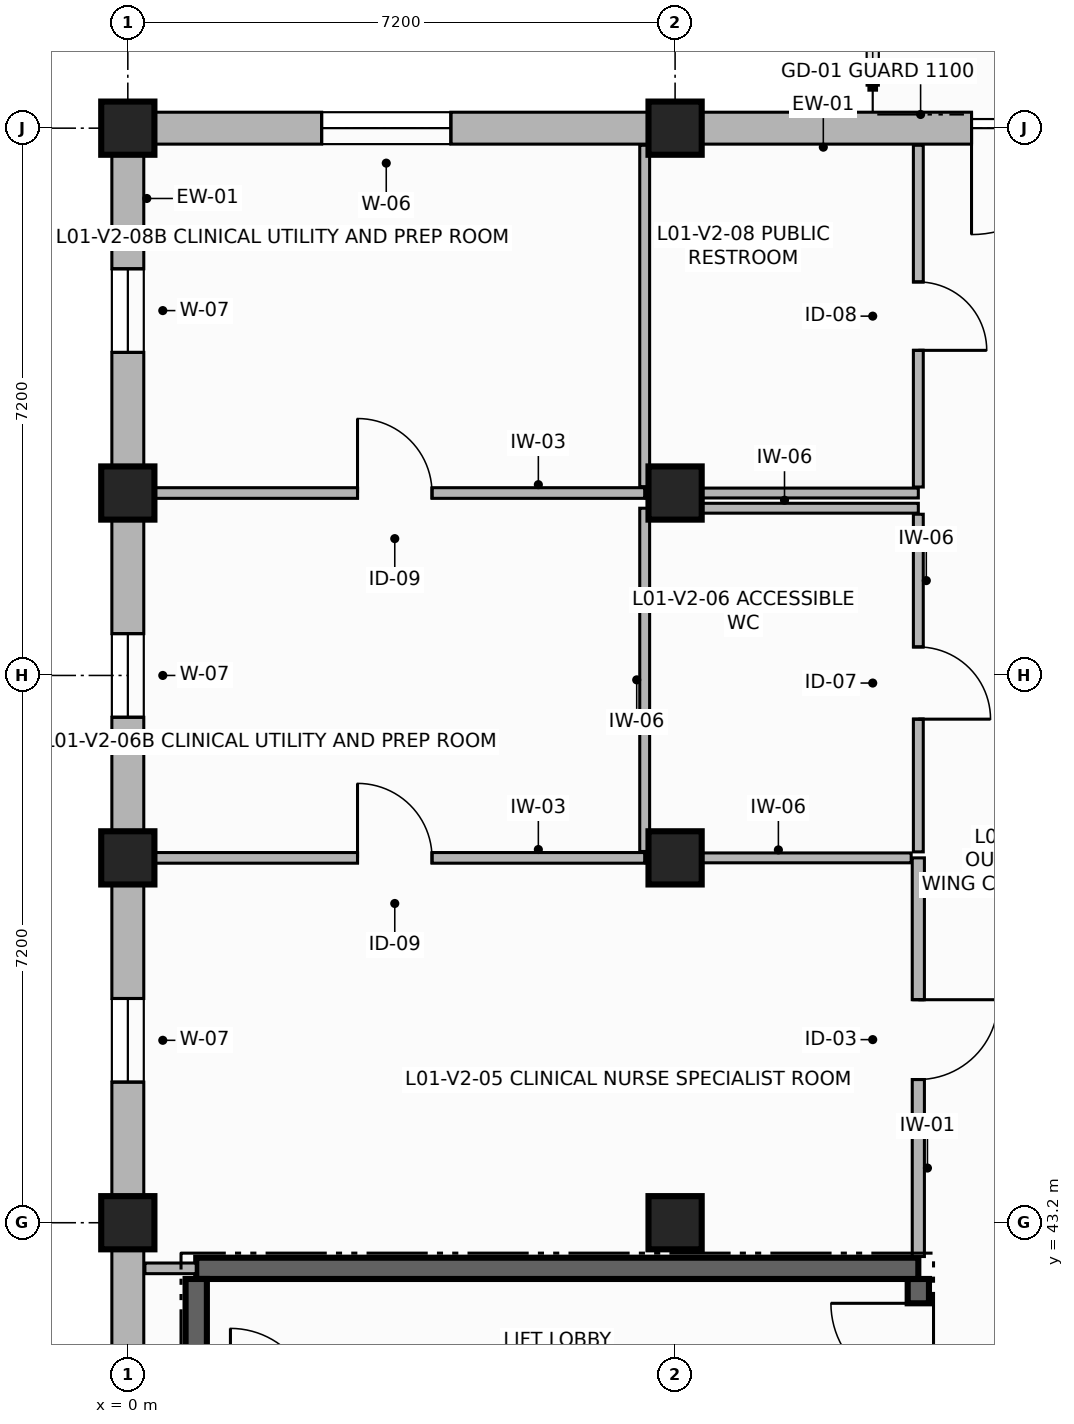
"""IFC4 building model, lengths in metres.
Left out: names, types, materials, properties, quantities, classifications, styles, units other than length and angle.
Written with IfcOpenShell. Run it as: python <this file> out.ifc"""

import sys

from ifc_helpers import new_model, si_unit, direction, frame, frame_2d, origin, origin_2d, place, context, subcontext, project, spatial, rectangle, extrude, element, fill, save


model = new_model("IFC4")
c1 = context("Model", 3, precision=1e-05, world=origin(), true_north=direction((0.0, 1.0)))
c2 = subcontext(c1, "Body", "Model", "MODEL_VIEW")
j1 = project(units=[si_unit("LENGTHUNIT", "METRE"), si_unit("PLANEANGLEUNIT", "RADIAN")], contexts=[c1])
p1 = place(None, origin())
s1 = spatial("IfcSite", under=j1, at=p1, CompositionType="ELEMENT")
p2 = place(p1, origin())
s2 = spatial("IfcBuilding", under=s1, at=p2, CompositionType="ELEMENT")
p3 = place(p2, frame((0.0, 0.0, 4.5)))
s3 = spatial("IfcBuildingStorey", under=s2, at=p3, CompositionType="ELEMENT", Elevation=4.5)
for number, where, z_axis, x_axis in (
    (1, (0.0, 43.2, 0.0), (0.0, 0.0, 1.0), (1.0, 0.0, 0.0)),
    (2, (0.0, 48.0, 0.0), (0.0, 0.0, 1.0), (1.0, 0.0, 0.0)),
    (3, (0.0, 52.8, 0.0), (0.0, 0.0, 1.0), (1.0, 0.0, 0.0)),
    (4, (0.0, 57.6, 0.0), (0.0, 0.0, 1.0), (1.0, 0.0, 0.0)),
    (5, (7.2, 43.2, 0.0), (0.0, 0.0, 1.0), (1.0, 0.0, 0.0)),
    (6, (7.2, 48.0, 0.0), (0.0, 0.0, 1.0), (1.0, 0.0, 0.0)),
    (7, (7.2, 52.8, 0.0), (0.0, 0.0, 1.0), (1.0, 0.0, 0.0)),
    (8, (7.2, 57.6, 0.0), (0.0, 0.0, 1.0), (1.0, 0.0, 0.0)),
):
    element("IfcColumn", number, at=place(p3, frame(where, z_axis=z_axis, x_axis=x_axis)), inside=s3, PredefinedType="COLUMN", context=c2, shape_type="SweptSolid", body=[
        extrude(rectangle(XDim=0.7, YDim=0.7, at=origin_2d()), origin(), (0.0, 0.0, 1.0), 3.62),
    ])
p4 = place(p3, frame((14.4, 57.6, 0.0), z_axis=(0.0, 0.0, 1.0), x_axis=(-1.0, 0.0, 0.0)))
e9 = element("IfcWall", 9, at=p4, inside=s3, PredefinedType="SOLIDWALL", context=c2, shape_type="SweptSolid", body=[
    extrude(rectangle(XDim=7.2, YDim=0.42, at=frame_2d((3.6, 0.0))), origin(), (0.0, 0.0, 1.0), 3.0),
])
p5 = place(p4, frame((1.9, 0.0, 0.0)))
e10 = element("IfcOpeningElement", 10, at=p5, cuts=e9, PredefinedType="OPENING", context=c2, shape_type="SweptSolid", body=[
    extrude(rectangle(XDim=1.4, YDim=2.25, at=frame_2d((0.7, 1.125))), frame((0.0, 0.22, 0.0), z_axis=(0.0, -1.0, 0.0), x_axis=(1.0, 0.0, 0.0)), (0.0, 0.0, 1.0), 0.44),
])
p6 = place(p3, frame((7.2, 57.6, 0.0), z_axis=(0.0, 0.0, 1.0), x_axis=(-1.0, 0.0, 0.0)))
e11 = element("IfcWall", 11, at=p6, inside=s3, PredefinedType="SOLIDWALL", context=c2, shape_type="SweptSolid", body=[
    extrude(rectangle(XDim=7.2, YDim=0.42, at=frame_2d((3.6, 0.0))), origin(), (0.0, 0.0, 1.0), 3.0),
])
p7 = place(p6, frame((2.95, 0.0, 0.85)))
e12 = element("IfcOpeningElement", 12, at=p7, cuts=e11, PredefinedType="OPENING", context=c2, shape_type="SweptSolid", body=[
    extrude(rectangle(XDim=1.7, YDim=1.9, at=frame_2d((0.85, 0.95))), frame((0.0, 0.22, 0.0), z_axis=(0.0, -1.0, 0.0), x_axis=(1.0, 0.0, 0.0)), (0.0, 0.0, 1.0), 0.44),
])
p8 = place(p3, frame((0.0, 57.6, 0.0), z_axis=(0.0, 0.0, 1.0), x_axis=(0.0, -1.0, 0.0)))
e13 = element("IfcWall", 13, at=p8, inside=s3, PredefinedType="SOLIDWALL", context=c2, shape_type="SweptSolid", body=[
    extrude(rectangle(XDim=4.8, YDim=0.42, at=frame_2d((2.4, 0.0))), origin(), (0.0, 0.0, 1.0), 3.0),
])
p9 = place(p8, frame((1.85, 0.0, 0.85)))
e14 = element("IfcOpeningElement", 14, at=p9, cuts=e13, PredefinedType="OPENING", context=c2, shape_type="SweptSolid", body=[
    extrude(rectangle(XDim=1.1, YDim=1.85, at=frame_2d((0.55, 0.925))), frame((0.0, 0.22, 0.0), z_axis=(0.0, -1.0, 0.0), x_axis=(1.0, 0.0, 0.0)), (0.0, 0.0, 1.0), 0.44),
])
p10 = place(p3, frame((0.0, 52.8, 0.0), z_axis=(0.0, 0.0, 1.0), x_axis=(0.0, -1.0, 0.0)))
e15 = element("IfcWall", 15, at=p10, inside=s3, PredefinedType="SOLIDWALL", context=c2, shape_type="SweptSolid", body=[
    extrude(rectangle(XDim=4.8, YDim=0.42, at=frame_2d((2.4, 0.0))), origin(), (0.0, 0.0, 1.0), 3.0),
])
p11 = place(p10, frame((1.85, 0.0, 0.85)))
e16 = element("IfcOpeningElement", 16, at=p11, cuts=e15, PredefinedType="OPENING", context=c2, shape_type="SweptSolid", body=[
    extrude(rectangle(XDim=1.1, YDim=1.85, at=frame_2d((0.55, 0.925))), frame((0.0, 0.22, 0.0), z_axis=(0.0, -1.0, 0.0), x_axis=(1.0, 0.0, 0.0)), (0.0, 0.0, 1.0), 0.44),
])
p12 = place(p3, frame((0.0, 48.0, 0.0), z_axis=(0.0, 0.0, 1.0), x_axis=(0.0, -1.0, 0.0)))
e17 = element("IfcWall", 17, at=p12, inside=s3, PredefinedType="SOLIDWALL", context=c2, shape_type="SweptSolid", body=[
    extrude(rectangle(XDim=4.8, YDim=0.42, at=frame_2d((2.4, 0.0))), origin(), (0.0, 0.0, 1.0), 3.0),
])
p13 = place(p12, frame((1.85, 0.0, 0.85)))
e18 = element("IfcOpeningElement", 18, at=p13, cuts=e17, PredefinedType="OPENING", context=c2, shape_type="SweptSolid", body=[
    extrude(rectangle(XDim=1.1, YDim=1.85, at=frame_2d((0.55, 0.925))), frame((0.0, 0.22, 0.0), z_axis=(0.0, -1.0, 0.0), x_axis=(1.0, 0.0, 0.0)), (0.0, 0.0, 1.0), 0.44),
])
p14 = place(p3, frame((0.0, 43.2, 0.0), z_axis=(0.0, 0.0, 1.0), x_axis=(0.0, -1.0, 0.0)))
e19 = element("IfcWall", 19, at=p14, inside=s3, PredefinedType="SOLIDWALL", context=c2, shape_type="SweptSolid", body=[
    extrude(rectangle(XDim=7.2, YDim=0.42, at=frame_2d((3.6, 0.0))), origin(), (0.0, 0.0, 1.0), 3.0),
])
p15 = place(p14, frame((2.75, 0.0, 0.85)))
e20 = element("IfcOpeningElement", 20, at=p15, cuts=e19, PredefinedType="OPENING", context=c2, shape_type="SweptSolid", body=[
    extrude(rectangle(XDim=1.5, YDim=1.9, at=frame_2d((0.75, 0.95))), frame((0.0, 0.22, 0.0), z_axis=(0.0, -1.0, 0.0), x_axis=(1.0, 0.0, 0.0)), (0.0, 0.0, 1.0), 0.44),
])
p16 = place(p3, frame((10.4, 36.94, 0.0), z_axis=(0.0, 0.0, 1.0), x_axis=(0.0, 1.0, 0.0)))
e21 = element("IfcWall", 21, at=p16, inside=s3, PredefinedType="SHEAR", context=c2, shape_type="SweptSolid", body=[
    extrude(rectangle(XDim=5.52, YDim=0.28, at=frame_2d((2.76, 0.0))), origin(), (0.0, 0.0, 1.0), 3.62),
])
p17 = place(p16, frame((4.05, 0.0, 0.0)))
e22 = element("IfcOpeningElement", 22, at=p17, cuts=e21, PredefinedType="OPENING", context=c2, shape_type="SweptSolid", body=[
    extrude(rectangle(XDim=1.15, YDim=2.2, at=frame_2d((0.575, 1.1))), frame((0.0, 0.15, 0.0), z_axis=(0.0, -1.0, 0.0), x_axis=(1.0, 0.0, 0.0)), (0.0, 0.0, 1.0), 0.3),
])
p18 = place(p3, frame((10.4, 42.6, 0.0), z_axis=(0.0, 0.0, 1.0), x_axis=(-1.0, 0.0, 0.0)))
e23 = element("IfcWall", 23, at=p18, inside=s3, PredefinedType="SHEAR", context=c2, shape_type="SweptSolid", body=[
    extrude(rectangle(XDim=9.5, YDim=0.28, at=frame_2d((4.75, 0.0))), origin(), (0.0, 0.0, 1.0), 3.62),
])
p19 = place(p3, frame((0.9, 42.46, 0.0), z_axis=(0.0, 0.0, 1.0), x_axis=(0.0, -1.0, 0.0)))
e24 = element("IfcWall", 24, at=p19, inside=s3, PredefinedType="SHEAR", context=c2, shape_type="SweptSolid", body=[
    extrude(rectangle(XDim=5.52, YDim=0.28, at=frame_2d((2.76, 0.0))), origin(), (0.0, 0.0, 1.0), 3.62),
])
p20 = place(p3, frame((10.4, 48.0, 0.0), z_axis=(0.0, 0.0, 1.0), x_axis=(0.0, -1.0, 0.0)))
e25 = element("IfcWall", 25, at=p20, inside=s3, PredefinedType="PARTITIONING", context=c2, shape_type="SweptSolid", body=[
    extrude(rectangle(XDim=5.245, YDim=0.16, at=frame_2d((2.623, 0.0))), origin(), (0.0, 0.0, 1.0), 2.98),
])
p21 = place(p20, frame((1.866, 0.0, 0.0)))
e26 = element("IfcOpeningElement", 26, at=p21, cuts=e25, PredefinedType="OPENING", context=c2, shape_type="SweptSolid", body=[
    extrude(rectangle(XDim=1.05, YDim=2.15, at=frame_2d((0.525, 1.075))), frame((0.0, 0.09, 0.0), z_axis=(0.0, -1.0, 0.0), x_axis=(1.0, 0.0, 0.0)), (0.0, 0.0, 1.0), 0.18),
])
p22 = place(p3, frame((0.9, 42.6, 0.0), z_axis=(0.0, 0.0, 1.0), x_axis=(-1.0, 0.0, 0.0)))
e27 = element("IfcWall", 27, at=p22, inside=s3, PredefinedType="PARTITIONING", context=c2, shape_type="SweptSolid", body=[
    extrude(rectangle(XDim=0.675, YDim=0.14, at=frame_2d((0.337, 0.0))), origin(), (0.0, 0.0, 1.0), 2.98),
])
p23 = place(p3, frame((0.225, 48.0, 0.0), z_axis=(0.0, 0.0, 1.0), x_axis=(1.0, 0.0, 0.0)))
e28 = element("IfcWall", 28, at=p23, inside=s3, PredefinedType="PARTITIONING", context=c2, shape_type="SweptSolid", body=[
    extrude(rectangle(XDim=6.575, YDim=0.14, at=frame_2d((3.288, 0.0))), origin(), (0.0, 0.0, 1.0), 2.98),
])
p24 = place(p23, frame((2.797, 0.0, 0.0)))
e29 = element("IfcOpeningElement", 29, at=p24, cuts=e28, PredefinedType="OPENING", context=c2, shape_type="SweptSolid", body=[
    extrude(rectangle(XDim=0.98, YDim=2.15, at=frame_2d((0.49, 1.075))), frame((0.0, 0.08, 0.0), z_axis=(0.0, -1.0, 0.0), x_axis=(1.0, 0.0, 0.0)), (0.0, 0.0, 1.0), 0.16),
])
p25 = place(p3, frame((6.812, 48.0, 0.0), z_axis=(0.0, 0.0, 1.0), x_axis=(1.0, 0.0, 0.0)))
e30 = element("IfcWall", 30, at=p25, inside=s3, PredefinedType="PARTITIONING", context=c2, shape_type="SweptSolid", body=[
    extrude(rectangle(XDim=3.494, YDim=0.13, at=frame_2d((1.747, 0.0))), origin(), (0.0, 0.0, 1.0), 2.98),
])
p26 = place(p3, frame((6.8, 48.084, 0.0), z_axis=(0.0, 0.0, 1.0), x_axis=(0.0, 1.0, 0.0)))
e31 = element("IfcWall", 31, at=p26, inside=s3, PredefinedType="PARTITIONING", context=c2, shape_type="SweptSolid", body=[
    extrude(rectangle(XDim=4.516, YDim=0.13, at=frame_2d((2.258, 0.0))), origin(), (0.0, 0.0, 1.0), 2.98),
])
p27 = place(p3, frame((6.879, 52.6, 0.0), z_axis=(0.0, 0.0, 1.0), x_axis=(1.0, 0.0, 0.0)))
e32 = element("IfcWall", 32, at=p27, inside=s3, PredefinedType="PARTITIONING", context=c2, shape_type="SweptSolid", body=[
    extrude(rectangle(XDim=3.521, YDim=0.13, at=frame_2d((1.76, 0.0))), origin(), (0.0, 0.0, 1.0), 2.98),
])
p28 = place(p3, frame((10.4, 52.521, 0.0), z_axis=(0.0, 0.0, 1.0), x_axis=(0.0, -1.0, 0.0)))
e33 = element("IfcWall", 33, at=p28, inside=s3, PredefinedType="PARTITIONING", context=c2, shape_type="SweptSolid", body=[
    extrude(rectangle(XDim=4.442, YDim=0.13, at=frame_2d((2.221, 0.0))), origin(), (0.0, 0.0, 1.0), 2.98),
])
p29 = place(p28, frame((1.746, 0.0, 0.0)))
e34 = element("IfcOpeningElement", 34, at=p29, cuts=e33, PredefinedType="OPENING", context=c2, shape_type="SweptSolid", body=[
    extrude(rectangle(XDim=0.95, YDim=2.1, at=frame_2d((0.475, 1.05))), frame((0.0, 0.075, 0.0), z_axis=(0.0, -1.0, 0.0), x_axis=(1.0, 0.0, 0.0)), (0.0, 0.0, 1.0), 0.15),
])
p30 = place(p3, frame((0.225, 52.8, 0.0), z_axis=(0.0, 0.0, 1.0), x_axis=(1.0, 0.0, 0.0)))
e35 = element("IfcWall", 35, at=p30, inside=s3, PredefinedType="PARTITIONING", context=c2, shape_type="SweptSolid", body=[
    extrude(rectangle(XDim=6.575, YDim=0.14, at=frame_2d((3.288, 0.0))), origin(), (0.0, 0.0, 1.0), 2.98),
])
p31 = place(p30, frame((2.797, 0.0, 0.0)))
e36 = element("IfcOpeningElement", 36, at=p31, cuts=e35, PredefinedType="OPENING", context=c2, shape_type="SweptSolid", body=[
    extrude(rectangle(XDim=0.98, YDim=2.15, at=frame_2d((0.49, 1.075))), frame((0.0, 0.08, 0.0), z_axis=(0.0, -1.0, 0.0), x_axis=(1.0, 0.0, 0.0)), (0.0, 0.0, 1.0), 0.16),
])
p32 = place(p3, frame((6.812, 52.8, 0.0), z_axis=(0.0, 0.0, 1.0), x_axis=(1.0, 0.0, 0.0)))
e37 = element("IfcWall", 37, at=p32, inside=s3, PredefinedType="PARTITIONING", context=c2, shape_type="SweptSolid", body=[
    extrude(rectangle(XDim=3.588, YDim=0.13, at=frame_2d((1.794, 0.0))), origin(), (0.0, 0.0, 1.0), 2.98),
])
p33 = place(p3, frame((6.8, 52.884, 0.0), z_axis=(0.0, 0.0, 1.0), x_axis=(0.0, 1.0, 0.0)))
e38 = element("IfcWall", 38, at=p33, inside=s3, PredefinedType="PARTITIONING", context=c2, shape_type="SweptSolid", body=[
    extrude(rectangle(XDim=4.491, YDim=0.13, at=frame_2d((2.246, 0.0))), origin(), (0.0, 0.0, 1.0), 2.98),
])
p34 = place(p3, frame((10.4, 57.375, 0.0), z_axis=(0.0, 0.0, 1.0), x_axis=(0.0, -1.0, 0.0)))
e39 = element("IfcWall", 39, at=p34, inside=s3, PredefinedType="PARTITIONING", context=c2, shape_type="SweptSolid", body=[
    extrude(rectangle(XDim=4.496, YDim=0.13, at=frame_2d((2.248, 0.0))), origin(), (0.0, 0.0, 1.0), 2.98),
])
p35 = place(p34, frame((1.798, 0.0, 0.0)))
e40 = element("IfcOpeningElement", 40, at=p35, cuts=e39, PredefinedType="OPENING", context=c2, shape_type="SweptSolid", body=[
    extrude(rectangle(XDim=0.9, YDim=2.1, at=frame_2d((0.45, 1.05))), frame((0.0, 0.075, 0.0), z_axis=(0.0, -1.0, 0.0), x_axis=(1.0, 0.0, 0.0)), (0.0, 0.0, 1.0), 0.15),
])
p36 = place(p5, origin())
e41 = element("IfcDoor", 41, at=p36, inside=s3, OperationType="SINGLE_SWING_RIGHT", PredefinedType="DOOR", context=c2, shape_type="SweptSolid", body=[
    extrude(rectangle(XDim=1.4, YDim=2.25, at=frame_2d((0.7, 1.125))), frame((0.0, 0.025, 0.0), z_axis=(0.0, -1.0, 0.0), x_axis=(1.0, 0.0, 0.0)), (0.0, 0.0, 1.0), 0.05),
])
fill(e10, e41)
p37 = place(p7, origin())
e42 = element("IfcWindow", 42, at=p37, inside=s3, PartitioningType="SINGLE_PANEL", PredefinedType="WINDOW", context=c2, shape_type="SweptSolid", body=[
    extrude(rectangle(XDim=1.7, YDim=1.9, at=frame_2d((0.85, 0.95))), frame((0.0, 0.03, 0.0), z_axis=(0.0, -1.0, 0.0), x_axis=(1.0, 0.0, 0.0)), (0.0, 0.0, 1.0), 0.06),
])
fill(e12, e42)
p38 = place(p9, origin())
e43 = element("IfcWindow", 43, at=p38, inside=s3, PartitioningType="SINGLE_PANEL", PredefinedType="WINDOW", context=c2, shape_type="SweptSolid", body=[
    extrude(rectangle(XDim=1.1, YDim=1.85, at=frame_2d((0.55, 0.925))), frame((0.0, 0.03, 0.0), z_axis=(0.0, -1.0, 0.0), x_axis=(1.0, 0.0, 0.0)), (0.0, 0.0, 1.0), 0.06),
])
fill(e14, e43)
p39 = place(p11, origin())
e44 = element("IfcWindow", 44, at=p39, inside=s3, PartitioningType="SINGLE_PANEL", PredefinedType="WINDOW", context=c2, shape_type="SweptSolid", body=[
    extrude(rectangle(XDim=1.1, YDim=1.85, at=frame_2d((0.55, 0.925))), frame((0.0, 0.03, 0.0), z_axis=(0.0, -1.0, 0.0), x_axis=(1.0, 0.0, 0.0)), (0.0, 0.0, 1.0), 0.06),
])
fill(e16, e44)
p40 = place(p13, origin())
e45 = element("IfcWindow", 45, at=p40, inside=s3, PartitioningType="SINGLE_PANEL", PredefinedType="WINDOW", context=c2, shape_type="SweptSolid", body=[
    extrude(rectangle(XDim=1.1, YDim=1.85, at=frame_2d((0.55, 0.925))), frame((0.0, 0.03, 0.0), z_axis=(0.0, -1.0, 0.0), x_axis=(1.0, 0.0, 0.0)), (0.0, 0.0, 1.0), 0.06),
])
fill(e18, e45)
p41 = place(p17, origin())
e46 = element("IfcDoor", 46, at=p41, inside=s3, OperationType="SINGLE_SWING_RIGHT", PredefinedType="DOOR", context=c2, shape_type="SweptSolid", body=[
    extrude(rectangle(XDim=1.15, YDim=2.2, at=frame_2d((0.575, 1.1))), frame((0.0, 0.025, 0.0), z_axis=(0.0, -1.0, 0.0), x_axis=(1.0, 0.0, 0.0)), (0.0, 0.0, 1.0), 0.05),
])
fill(e22, e46)
p42 = place(p21, origin())
e47 = element("IfcDoor", 47, at=p42, inside=s3, OperationType="SINGLE_SWING_LEFT", PredefinedType="DOOR", context=c2, shape_type="SweptSolid", body=[
    extrude(rectangle(XDim=1.05, YDim=2.15, at=frame_2d((0.525, 1.075))), frame((0.0, 0.025, 0.0), z_axis=(0.0, -1.0, 0.0), x_axis=(1.0, 0.0, 0.0)), (0.0, 0.0, 1.0), 0.05),
])
fill(e26, e47)
p43 = place(p29, origin())
e48 = element("IfcDoor", 48, at=p43, inside=s3, OperationType="SINGLE_SWING_RIGHT", PredefinedType="DOOR", context=c2, shape_type="SweptSolid", body=[
    extrude(rectangle(XDim=0.95, YDim=2.1, at=frame_2d((0.475, 1.05))), frame((0.0, 0.025, 0.0), z_axis=(0.0, -1.0, 0.0), x_axis=(1.0, 0.0, 0.0)), (0.0, 0.0, 1.0), 0.05),
])
fill(e34, e48)
p44 = place(p24, origin())
e49 = element("IfcDoor", 49, at=p44, inside=s3, OperationType="SINGLE_SWING_LEFT", PredefinedType="DOOR", context=c2, shape_type="SweptSolid", body=[
    extrude(rectangle(XDim=0.98, YDim=2.15, at=frame_2d((0.49, 1.075))), frame((0.0, 0.025, 0.0), z_axis=(0.0, -1.0, 0.0), x_axis=(1.0, 0.0, 0.0)), (0.0, 0.0, 1.0), 0.05),
])
fill(e29, e49)
p45 = place(p35, origin())
e50 = element("IfcDoor", 50, at=p45, inside=s3, OperationType="SINGLE_SWING_RIGHT", PredefinedType="DOOR", context=c2, shape_type="SweptSolid", body=[
    extrude(rectangle(XDim=0.9, YDim=2.1, at=frame_2d((0.45, 1.05))), frame((0.0, 0.025, 0.0), z_axis=(0.0, -1.0, 0.0), x_axis=(1.0, 0.0, 0.0)), (0.0, 0.0, 1.0), 0.05),
])
fill(e40, e50)
p46 = place(p31, origin())
e51 = element("IfcDoor", 51, at=p46, inside=s3, OperationType="SINGLE_SWING_LEFT", PredefinedType="DOOR", context=c2, shape_type="SweptSolid", body=[
    extrude(rectangle(XDim=0.98, YDim=2.15, at=frame_2d((0.49, 1.075))), frame((0.0, 0.025, 0.0), z_axis=(0.0, -1.0, 0.0), x_axis=(1.0, 0.0, 0.0)), (0.0, 0.0, 1.0), 0.05),
])
fill(e36, e51)
save(model, sys.argv[1])
